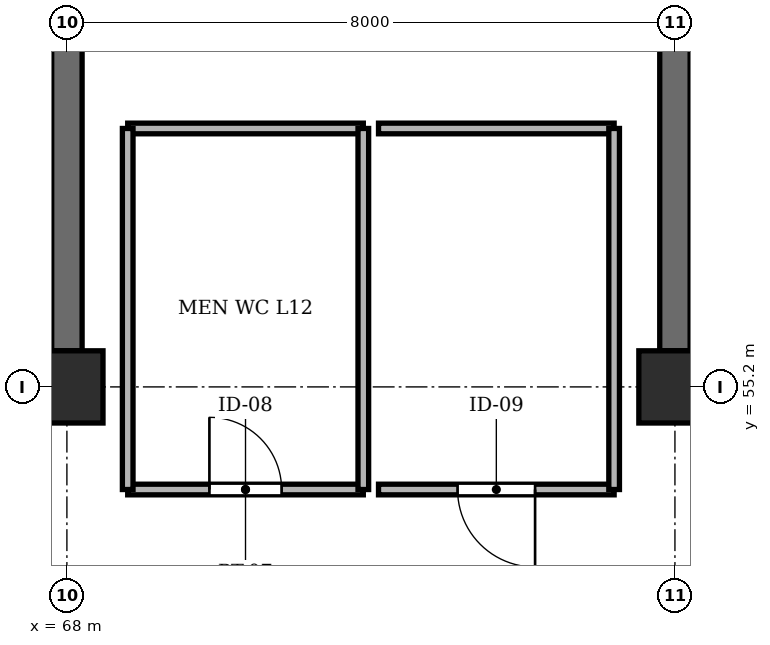
"""IFC4 building model, lengths in metres.
Left out: names, types, materials, properties, quantities, classifications, styles, units other than length and angle.
Written with IfcOpenShell. Run it as: python <this file> out.ifc"""

import sys

from ifc_helpers import new_model, si_unit, direction, frame, frame_2d, origin, origin_2d, place, context, subcontext, project, spatial, rectangle, extrude, element, fill, save


model = new_model("IFC4")
c1 = context("Model", 3, precision=1e-05, world=origin(), true_north=direction((0.0, 1.0)))
c2 = subcontext(c1, "Body", "Model", "MODEL_VIEW")
j1 = project(units=[si_unit("LENGTHUNIT", "METRE"), si_unit("PLANEANGLEUNIT", "RADIAN")], contexts=[c1])
p1 = place(None, origin())
s1 = spatial("IfcSite", under=j1, at=p1, CompositionType="ELEMENT")
p2 = place(p1, origin())
s2 = spatial("IfcBuilding", under=s1, at=p2, CompositionType="ELEMENT")
p3 = place(p2, frame((0.0, 0.0, 50.3)))
s3 = spatial("IfcBuildingStorey", under=s2, at=p3, CompositionType="ELEMENT", Elevation=50.3)
for number, where, z_axis, x_axis in (
    (1, (68.0, 55.2, -0.23), (0.0, 0.0, 1.0), (1.0, 0.0, 0.0)),
    (2, (76.0, 55.2, -0.23), (0.0, 0.0, 1.0), (1.0, 0.0, 0.0)),
):
    element("IfcColumn", number, at=place(p3, frame(where, z_axis=z_axis, x_axis=x_axis)), inside=s3, PredefinedType="COLUMN", context=c2, shape_type="SweptSolid", body=[
        extrude(rectangle(XDim=0.95, YDim=0.95, at=origin_2d()), origin(), (0.0, 0.0, 1.0), 3.26),
    ])
for number, where, z_axis, x_axis in (
    (3, (68.0, 55.675, 0.0), (0.0, 0.0, 1.0), (0.0, 1.0, 0.0)),
    (4, (76.0, 55.675, 0.0), (0.0, 0.0, 1.0), (0.0, 1.0, 0.0)),
):
    element("IfcWall", number, at=place(p3, frame(where, z_axis=z_axis, x_axis=x_axis)), inside=s3, PredefinedType="SHEAR", context=c2, shape_type="SweptSolid", body=[
        extrude(rectangle(XDim=6.375, YDim=0.4, at=frame_2d((3.188, 0.0))), origin(), (0.0, 0.0, 1.0), 3.03),
    ])
p4 = place(p3, frame((68.8, 53.85, 0.0), z_axis=(0.0, 0.0, 1.0), x_axis=(1.0, 0.0, 0.0)))
e5 = element("IfcWall", 5, at=p4, inside=s3, PredefinedType="PARTITIONING", context=c2, shape_type="SweptSolid", body=[
    extrude(rectangle(XDim=3.1, YDim=0.14, at=frame_2d((1.55, 0.0))), origin(), (0.0, 0.0, 1.0), 2.53),
])
p5 = place(p4, frame((1.075, 0.0, 0.0)))
e6 = element("IfcOpeningElement", 6, at=p5, cuts=e5, PredefinedType="OPENING", context=c2, shape_type="SweptSolid", body=[
    extrude(rectangle(XDim=0.95, YDim=2.1, at=frame_2d((0.475, 1.05))), frame((0.0, 0.082, 0.0), z_axis=(0.0, -1.0, 0.0), x_axis=(1.0, 0.0, 0.0)), (0.0, 0.0, 1.0), 0.164),
])
p6 = place(p3, frame((68.8, 58.6, 0.0), z_axis=(0.0, 0.0, 1.0), x_axis=(1.0, 0.0, 0.0)))
e7 = element("IfcWall", 7, at=p6, inside=s3, PredefinedType="PARTITIONING", context=c2, shape_type="SweptSolid", body=[
    extrude(rectangle(XDim=3.1, YDim=0.14, at=frame_2d((1.55, 0.0))), origin(), (0.0, 0.0, 1.0), 2.53),
])
for number, where, z_axis, x_axis in (
    (8, (68.8, 53.85, 0.0), (0.0, 0.0, 1.0), (0.0, 1.0, 0.0)),
    (9, (71.9, 53.85, 0.0), (0.0, 0.0, 1.0), (0.0, 1.0, 0.0)),
):
    element("IfcWall", number, at=place(p3, frame(where, z_axis=z_axis, x_axis=x_axis)), inside=s3, PredefinedType="PARTITIONING", context=c2, shape_type="SweptSolid", body=[
        extrude(rectangle(XDim=4.75, YDim=0.14, at=frame_2d((2.375, 0.0))), origin(), (0.0, 0.0, 1.0), 2.53),
    ])
p7 = place(p3, frame((72.1, 53.85, 0.0), z_axis=(0.0, 0.0, 1.0), x_axis=(1.0, 0.0, 0.0)))
e10 = element("IfcWall", 10, at=p7, inside=s3, PredefinedType="PARTITIONING", context=c2, shape_type="SweptSolid", body=[
    extrude(rectangle(XDim=3.1, YDim=0.14, at=frame_2d((1.55, 0.0))), origin(), (0.0, 0.0, 1.0), 2.53),
])
p8 = place(p7, frame((1.04, 0.0, 0.0)))
e11 = element("IfcOpeningElement", 11, at=p8, cuts=e10, PredefinedType="OPENING", context=c2, shape_type="SweptSolid", body=[
    extrude(rectangle(XDim=1.02, YDim=2.1, at=frame_2d((0.51, 1.05))), frame((0.0, 0.082, 0.0), z_axis=(0.0, -1.0, 0.0), x_axis=(1.0, 0.0, 0.0)), (0.0, 0.0, 1.0), 0.164),
])
p9 = place(p3, frame((72.1, 58.6, 0.0), z_axis=(0.0, 0.0, 1.0), x_axis=(1.0, 0.0, 0.0)))
e12 = element("IfcWall", 12, at=p9, inside=s3, PredefinedType="PARTITIONING", context=c2, shape_type="SweptSolid", body=[
    extrude(rectangle(XDim=3.1, YDim=0.14, at=frame_2d((1.55, 0.0))), origin(), (0.0, 0.0, 1.0), 2.53),
])
p10 = place(p3, frame((75.2, 53.85, 0.0), z_axis=(0.0, 0.0, 1.0), x_axis=(0.0, 1.0, 0.0)))
e13 = element("IfcWall", 13, at=p10, inside=s3, PredefinedType="PARTITIONING", context=c2, shape_type="SweptSolid", body=[
    extrude(rectangle(XDim=4.75, YDim=0.14, at=frame_2d((2.375, 0.0))), origin(), (0.0, 0.0, 1.0), 2.53),
])
p11 = place(p5, origin())
e14 = element("IfcDoor", 14, at=p11, inside=s3, OperationType="SINGLE_SWING_LEFT", PredefinedType="DOOR", context=c2, shape_type="SweptSolid", body=[
    extrude(rectangle(XDim=0.95, YDim=2.1, at=frame_2d((0.475, 1.05))), frame((0.0, 0.025, 0.0), z_axis=(0.0, -1.0, 0.0), x_axis=(1.0, 0.0, 0.0)), (0.0, 0.0, 1.0), 0.05),
])
fill(e6, e14)
p12 = place(p8, frame((1.02, 0.0, 0.0), z_axis=(0.0, 0.0, 1.0), x_axis=(-1.0, 0.0, 0.0)))
e15 = element("IfcDoor", 15, at=p12, inside=s3, OperationType="SINGLE_SWING_RIGHT", PredefinedType="DOOR", context=c2, shape_type="SweptSolid", body=[
    extrude(rectangle(XDim=1.02, YDim=2.1, at=frame_2d((0.51, 1.05))), frame((0.0, 0.025, 0.0), z_axis=(0.0, -1.0, 0.0), x_axis=(1.0, 0.0, 0.0)), (0.0, 0.0, 1.0), 0.05),
])
fill(e11, e15)
save(model, sys.argv[1])
